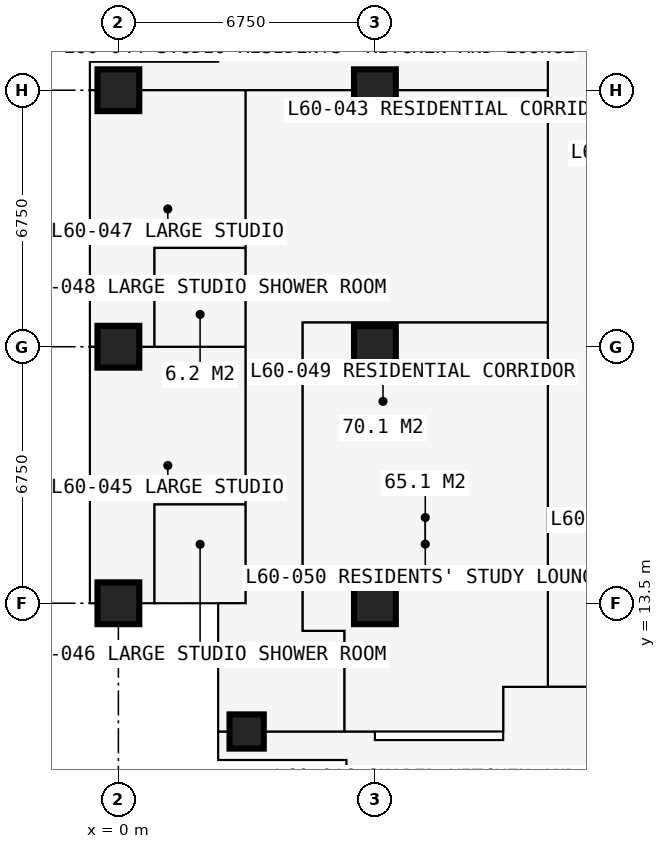
"""IFC4 building model, lengths in metres.
Left out: names, types, materials, properties, quantities, classifications, styles, units other than length and angle.
Written with IfcOpenShell. Run it as: python <this file> out.ifc"""

import sys

from ifc_helpers import new_model, si_unit, direction, frame, frame_2d, origin, origin_2d, place, context, subcontext, project, spatial, rectangle, extrude, element, fill, save


model = new_model("IFC4")
c1 = context("Model", 3, precision=1e-05, world=origin(), true_north=direction((0.0, 1.0)))
c2 = subcontext(c1, "Body", "Model", "MODEL_VIEW")
j1 = project(units=[si_unit("LENGTHUNIT", "METRE"), si_unit("PLANEANGLEUNIT", "RADIAN")], contexts=[c1])
p1 = place(None, origin())
s1 = spatial("IfcSite", under=j1, at=p1, CompositionType="ELEMENT")
p2 = place(p1, origin())
s2 = spatial("IfcBuilding", under=s1, at=p2, CompositionType="ELEMENT")
p3 = place(p2, frame((0.0, 0.0, 222.3)))
s3 = spatial("IfcBuildingStorey", under=s2, at=p3, CompositionType="ELEMENT", Elevation=222.3)
for number, where, z_axis, x_axis in (
    (1, (0.0, 13.5, 0.0), (0.0, 0.0, 1.0), (1.0, 0.0, 0.0)),
    (2, (0.0, 20.25, 0.0), (0.0, 0.0, 1.0), (1.0, 0.0, 0.0)),
    (3, (0.0, 27.0, 0.0), (0.0, 0.0, 1.0), (1.0, 0.0, 0.0)),
):
    element("IfcColumn", number, at=place(p3, frame(where, z_axis=z_axis, x_axis=x_axis)), inside=s3, PredefinedType="COLUMN", context=c2, shape_type="SweptSolid", body=[
        extrude(rectangle(XDim=1.1, YDim=1.1, at=origin_2d()), origin(), (0.0, 0.0, 1.0), 3.6),
    ])
p4 = place(p3, frame((3.375, 10.125, 0.0), z_axis=(0.0, 0.0, 1.0), x_axis=(1.0, 0.0, 0.0)))
e4 = element("IfcColumn", 4, at=p4, inside=s3, PredefinedType="COLUMN", context=c2, shape_type="SweptSolid", body=[
    extrude(rectangle(XDim=0.9, YDim=0.9, at=origin_2d()), origin(), (0.0, 0.0, 1.0), 3.6),
])
for number, where, z_axis, x_axis in (
    (5, (6.75, 13.5, 0.0), (0.0, 0.0, 1.0), (1.0, 0.0, 0.0)),
    (6, (6.75, 20.25, 0.0), (0.0, 0.0, 1.0), (1.0, 0.0, 0.0)),
    (7, (6.75, 27.0, 0.0), (0.0, 0.0, 1.0), (1.0, 0.0, 0.0)),
):
    element("IfcColumn", number, at=place(p3, frame(where, z_axis=z_axis, x_axis=x_axis)), inside=s3, PredefinedType="COLUMN", context=c2, shape_type="SweptSolid", body=[
        extrude(rectangle(XDim=1.1, YDim=1.1, at=origin_2d()), origin(), (0.0, 0.0, 1.0), 3.6),
    ])
p5 = place(p3, frame((2.625, 31.125, 0.0), z_axis=(0.0, 0.0, 1.0), x_axis=(0.0, -1.0, 0.0)))
e8 = element("IfcWall", 8, at=p5, inside=s3, PredefinedType="SOLIDWALL", context=c2, shape_type="SweptSolid", body=[
    extrude(rectangle(XDim=3.375, YDim=0.3, at=frame_2d((1.688, 0.0))), origin(), (0.0, 0.0, 1.0), 3.375),
])
p6 = place(p5, frame((0.788, 0.0, 0.6)))
e9 = element("IfcOpeningElement", 9, at=p6, cuts=e8, PredefinedType="OPENING", context=c2, shape_type="SweptSolid", body=[
    extrude(rectangle(XDim=1.8, YDim=2.1, at=frame_2d((0.9, 1.05))), frame((0.0, 0.16, 0.0), z_axis=(0.0, -1.0, 0.0), x_axis=(1.0, 0.0, 0.0)), (0.0, 0.0, 1.0), 0.32),
])
p7 = place(p3, frame((2.625, 27.75, 0.0), z_axis=(0.0, 0.0, 1.0), x_axis=(-1.0, 0.0, 0.0)))
e10 = element("IfcWall", 10, at=p7, inside=s3, PredefinedType="SOLIDWALL", context=c2, shape_type="SweptSolid", body=[
    extrude(rectangle(XDim=3.375, YDim=0.3, at=frame_2d((1.688, 0.0))), origin(), (0.0, 0.0, 1.0), 3.375),
])
p8 = place(p7, frame((0.788, 0.0, 0.6)))
e11 = element("IfcOpeningElement", 11, at=p8, cuts=e10, PredefinedType="OPENING", context=c2, shape_type="SweptSolid", body=[
    extrude(rectangle(XDim=1.8, YDim=2.1, at=frame_2d((0.9, 1.05))), frame((0.0, 0.16, 0.0), z_axis=(0.0, -1.0, 0.0), x_axis=(1.0, 0.0, 0.0)), (0.0, 0.0, 1.0), 0.32),
])
p9 = place(p3, frame((-0.75, 12.75, 0.0), z_axis=(0.0, 0.0, 1.0), x_axis=(1.0, 0.0, 0.0)))
e12 = element("IfcWall", 12, at=p9, inside=s3, PredefinedType="SOLIDWALL", context=c2, shape_type="SweptSolid", body=[
    extrude(rectangle(XDim=3.375, YDim=0.3, at=frame_2d((1.688, 0.0))), origin(), (0.0, 0.0, 1.0), 3.375),
])
p10 = place(p9, frame((0.788, 0.0, 0.6)))
e13 = element("IfcOpeningElement", 13, at=p10, cuts=e12, PredefinedType="OPENING", context=c2, shape_type="SweptSolid", body=[
    extrude(rectangle(XDim=1.8, YDim=2.1, at=frame_2d((0.9, 1.05))), frame((0.0, 0.16, 0.0), z_axis=(0.0, -1.0, 0.0), x_axis=(1.0, 0.0, 0.0)), (0.0, 0.0, 1.0), 0.32),
])
p11 = place(p3, frame((2.625, 12.75, 0.0), z_axis=(0.0, 0.0, 1.0), x_axis=(0.0, -1.0, 0.0)))
e14 = element("IfcWall", 14, at=p11, inside=s3, PredefinedType="SOLIDWALL", context=c2, shape_type="SweptSolid", body=[
    extrude(rectangle(XDim=3.375, YDim=0.3, at=frame_2d((1.688, 0.0))), origin(), (0.0, 0.0, 1.0), 3.375),
])
p12 = place(p11, frame((0.788, 0.0, 0.6)))
e15 = element("IfcOpeningElement", 15, at=p12, cuts=e14, PredefinedType="OPENING", context=c2, shape_type="SweptSolid", body=[
    extrude(rectangle(XDim=1.8, YDim=2.1, at=frame_2d((0.9, 1.05))), frame((0.0, 0.16, 0.0), z_axis=(0.0, -1.0, 0.0), x_axis=(1.0, 0.0, 0.0)), (0.0, 0.0, 1.0), 0.32),
])
p13 = place(p3, frame((2.625, 9.375, 0.0), z_axis=(0.0, 0.0, 1.0), x_axis=(1.0, 0.0, 0.0)))
e16 = element("IfcWall", 16, at=p13, inside=s3, PredefinedType="SOLIDWALL", context=c2, shape_type="SweptSolid", body=[
    extrude(rectangle(XDim=3.375, YDim=0.3, at=frame_2d((1.688, 0.0))), origin(), (0.0, 0.0, 1.0), 3.375),
])
p14 = place(p13, frame((0.788, 0.0, 0.6)))
e17 = element("IfcOpeningElement", 17, at=p14, cuts=e16, PredefinedType="OPENING", context=c2, shape_type="SweptSolid", body=[
    extrude(rectangle(XDim=1.8, YDim=2.1, at=frame_2d((0.9, 1.05))), frame((0.0, 0.16, 0.0), z_axis=(0.0, -1.0, 0.0), x_axis=(1.0, 0.0, 0.0)), (0.0, 0.0, 1.0), 0.32),
])
p15 = place(p3, frame((6.0, 9.375, 0.0), z_axis=(0.0, 0.0, 1.0), x_axis=(0.0, -1.0, 0.0)))
e18 = element("IfcWall", 18, at=p15, inside=s3, PredefinedType="SOLIDWALL", context=c2, shape_type="SweptSolid", body=[
    extrude(rectangle(XDim=3.375, YDim=0.3, at=frame_2d((1.688, 0.0))), origin(), (0.0, 0.0, 1.0), 3.375),
])
p16 = place(p15, frame((0.788, 0.0, 0.6)))
e19 = element("IfcOpeningElement", 19, at=p16, cuts=e18, PredefinedType="OPENING", context=c2, shape_type="SweptSolid", body=[
    extrude(rectangle(XDim=1.8, YDim=2.1, at=frame_2d((0.9, 1.05))), frame((0.0, 0.16, 0.0), z_axis=(0.0, -1.0, 0.0), x_axis=(1.0, 0.0, 0.0)), (0.0, 0.0, 1.0), 0.32),
])
p17 = place(p3, frame((-0.734, 13.5, 0.0), z_axis=(0.0, 0.0, 1.0), x_axis=(1.0, 0.0, 0.0)))
e20 = element("IfcWall", 20, at=p17, inside=s3, PredefinedType="PARTITIONING", context=c2, shape_type="SweptSolid", body=[
    extrude(rectangle(XDim=4.084, YDim=0.1, at=frame_2d((2.042, 0.0))), origin(), (0.0, 0.0, 1.0), 2.877),
])
p18 = place(p3, frame((-0.734, 20.25, 0.0), z_axis=(0.0, 0.0, 1.0), x_axis=(1.0, 0.0, 0.0)))
e21 = element("IfcWall", 21, at=p18, inside=s3, PredefinedType="PARTITIONING", context=c2, shape_type="SweptSolid", body=[
    extrude(rectangle(XDim=4.084, YDim=0.1, at=frame_2d((2.042, 0.0))), origin(), (0.0, 0.0, 1.0), 2.877),
])
p19 = place(p18, frame((2.434, 0.0, 0.0)))
e22 = element("IfcOpeningElement", 22, at=p19, cuts=e21, PredefinedType="OPENING", context=c2, shape_type="SweptSolid", body=[
    extrude(rectangle(XDim=0.9, YDim=2.2, at=frame_2d((0.45, 1.1))), frame((0.0, 0.06, 0.0), z_axis=(0.0, -1.0, 0.0), x_axis=(1.0, 0.0, 0.0)), (0.0, 0.0, 1.0), 0.12),
])
p20 = place(p3, frame((-0.734, 27.0, 0.0), z_axis=(0.0, 0.0, 1.0), x_axis=(1.0, 0.0, 0.0)))
e23 = element("IfcWall", 23, at=p20, inside=s3, PredefinedType="PARTITIONING", context=c2, shape_type="SweptSolid", body=[
    extrude(rectangle(XDim=12.034, YDim=0.15, at=frame_2d((6.017, 0.0))), origin(), (0.0, 0.0, 1.0), 2.877),
])
p21 = place(p3, frame((0.95, 13.5, 0.0), z_axis=(0.0, 0.0, 1.0), x_axis=(0.0, 1.0, 0.0)))
e24 = element("IfcWall", 24, at=p21, inside=s3, PredefinedType="PARTITIONING", context=c2, shape_type="SweptSolid", body=[
    extrude(rectangle(XDim=2.6, YDim=0.1, at=frame_2d((1.3, 0.0))), origin(), (0.0, 0.0, 1.0), 3.375),
])
p22 = place(p21, frame((0.85, 0.0, 0.0)))
e25 = element("IfcOpeningElement", 25, at=p22, cuts=e24, PredefinedType="OPENING", context=c2, shape_type="SweptSolid", body=[
    extrude(rectangle(XDim=0.9, YDim=2.2, at=frame_2d((0.45, 1.1))), frame((0.0, 0.06, 0.0), z_axis=(0.0, -1.0, 0.0), x_axis=(1.0, 0.0, 0.0)), (0.0, 0.0, 1.0), 0.12),
])
p23 = place(p3, frame((0.95, 16.1, 0.0), z_axis=(0.0, 0.0, 1.0), x_axis=(1.0, 0.0, 0.0)))
e26 = element("IfcWall", 26, at=p23, inside=s3, PredefinedType="PARTITIONING", context=c2, shape_type="SweptSolid", body=[
    extrude(rectangle(XDim=2.4, YDim=0.1, at=frame_2d((1.2, 0.0))), origin(), (0.0, 0.0, 1.0), 3.375),
])
p24 = place(p3, frame((0.95, 20.25, 0.0), z_axis=(0.0, 0.0, 1.0), x_axis=(0.0, 1.0, 0.0)))
e27 = element("IfcWall", 27, at=p24, inside=s3, PredefinedType="PARTITIONING", context=c2, shape_type="SweptSolid", body=[
    extrude(rectangle(XDim=2.6, YDim=0.1, at=frame_2d((1.3, 0.0))), origin(), (0.0, 0.0, 1.0), 3.375),
])
p25 = place(p3, frame((0.95, 22.85, 0.0), z_axis=(0.0, 0.0, 1.0), x_axis=(1.0, 0.0, 0.0)))
e28 = element("IfcWall", 28, at=p25, inside=s3, PredefinedType="PARTITIONING", context=c2, shape_type="SweptSolid", body=[
    extrude(rectangle(XDim=2.4, YDim=0.1, at=frame_2d((1.2, 0.0))), origin(), (0.0, 0.0, 1.0), 3.375),
])
p26 = place(p3, frame((2.625, 12.766, 0.0), z_axis=(0.0, 0.0, 1.0), x_axis=(0.0, 1.0, 0.0)))
e29 = element("IfcWall", 29, at=p26, inside=s3, PredefinedType="PARTITIONING", context=c2, shape_type="SweptSolid", body=[
    extrude(rectangle(XDim=0.734, YDim=0.15, at=frame_2d((0.367, 0.0))), origin(), (0.0, 0.0, 1.0), 3.375),
])
p27 = place(p3, frame((2.775, 10.125, 0.0), z_axis=(0.0, 0.0, 1.0), x_axis=(1.0, 0.0, 0.0)))
e30 = element("IfcWall", 30, at=p27, inside=s3, PredefinedType="PARTITIONING", context=c2, shape_type="SweptSolid", body=[
    extrude(rectangle(XDim=7.35, YDim=0.15, at=frame_2d((3.675, 0.0))), origin(), (0.0, 0.0, 1.0), 2.877),
])
p28 = place(p3, frame((3.35, 13.5, 0.0), z_axis=(0.0, 0.0, 1.0), x_axis=(0.0, 1.0, 0.0)))
e31 = element("IfcWall", 31, at=p28, inside=s3, PredefinedType="PARTITIONING", context=c2, shape_type="SweptSolid", body=[
    extrude(rectangle(XDim=13.5, YDim=0.15, at=frame_2d((6.75, 0.0))), origin(), (0.0, 0.0, 1.0), 3.375),
])
p29 = place(p28, frame((4.2, 0.0, 0.0)))
e32 = element("IfcOpeningElement", 32, at=p29, cuts=e31, PredefinedType="OPENING", context=c2, shape_type="SweptSolid", body=[
    extrude(rectangle(XDim=0.95, YDim=2.2, at=frame_2d((0.475, 1.1))), frame((0.0, 0.085, 0.0), z_axis=(0.0, -1.0, 0.0), x_axis=(1.0, 0.0, 0.0)), (0.0, 0.0, 1.0), 0.17),
])
p30 = place(p28, frame((10.95, 0.0, 0.0)))
e33 = element("IfcOpeningElement", 33, at=p30, cuts=e31, PredefinedType="OPENING", context=c2, shape_type="SweptSolid", body=[
    extrude(rectangle(XDim=0.95, YDim=2.2, at=frame_2d((0.475, 1.1))), frame((0.0, 0.085, 0.0), z_axis=(0.0, -1.0, 0.0), x_axis=(1.0, 0.0, 0.0)), (0.0, 0.0, 1.0), 0.17),
])
p31 = place(p3, frame((4.85, 12.775, 0.0), z_axis=(0.0, 0.0, 1.0), x_axis=(0.0, 1.0, 0.0)))
e34 = element("IfcWall", 34, at=p31, inside=s3, PredefinedType="PARTITIONING", context=c2, shape_type="SweptSolid", body=[
    extrude(rectangle(XDim=8.113, YDim=0.15, at=frame_2d((4.056, 0.0))), origin(), (0.0, 0.0, 1.0), 3.375),
])
p32 = place(p31, frame((3.6, 0.0, 0.0)))
e35 = element("IfcOpeningElement", 35, at=p32, cuts=e34, PredefinedType="OPENING", context=c2, shape_type="SweptSolid", body=[
    extrude(rectangle(XDim=0.95, YDim=2.2, at=frame_2d((0.475, 1.1))), frame((0.0, 0.085, 0.0), z_axis=(0.0, -1.0, 0.0), x_axis=(1.0, 0.0, 0.0)), (0.0, 0.0, 1.0), 0.17),
])
p33 = place(p3, frame((4.85, 12.775, 0.0), z_axis=(0.0, 0.0, 1.0), x_axis=(1.0, 0.0, 0.0)))
e36 = element("IfcWall", 36, at=p33, inside=s3, PredefinedType="PARTITIONING", context=c2, shape_type="SweptSolid", body=[
    extrude(rectangle(XDim=1.1, YDim=0.15, at=frame_2d((0.55, 0.0))), origin(), (0.0, 0.0, 1.0), 3.375),
])
p34 = place(p3, frame((4.85, 20.887, 0.0), z_axis=(0.0, 0.0, 1.0), x_axis=(1.0, 0.0, 0.0)))
e37 = element("IfcWall", 37, at=p34, inside=s3, PredefinedType="PARTITIONING", context=c2, shape_type="SweptSolid", body=[
    extrude(rectangle(XDim=6.45, YDim=0.15, at=frame_2d((3.225, 0.0))), origin(), (0.0, 0.0, 1.0), 3.375),
])
p35 = place(p3, frame((5.95, 10.125, 0.0), z_axis=(0.0, 0.0, 1.0), x_axis=(0.0, 1.0, 0.0)))
e38 = element("IfcWall", 38, at=p35, inside=s3, PredefinedType="PARTITIONING", context=c2, shape_type="SweptSolid", body=[
    extrude(rectangle(XDim=2.65, YDim=0.15, at=frame_2d((1.325, 0.0))), origin(), (0.0, 0.0, 1.0), 3.375),
])
p36 = place(p3, frame((6.75, 9.9, 0.0), z_axis=(0.0, 0.0, 1.0), x_axis=(1.0, 0.0, 0.0)))
e39 = element("IfcWall", 39, at=p36, inside=s3, PredefinedType="PARTITIONING", context=c2, shape_type="SweptSolid", body=[
    extrude(rectangle(XDim=3.375, YDim=0.15, at=frame_2d((1.688, 0.0))), origin(), (0.0, 0.0, 1.0), 3.375),
])
p37 = place(p3, frame((10.125, 9.9, 0.0), z_axis=(0.0, 0.0, 1.0), x_axis=(0.0, 1.0, 0.0)))
e40 = element("IfcWall", 40, at=p37, inside=s3, PredefinedType="PARTITIONING", context=c2, shape_type="SweptSolid", body=[
    extrude(rectangle(XDim=1.4, YDim=0.15, at=frame_2d((0.7, 0.0))), origin(), (0.0, 0.0, 1.0), 3.375),
])
p38 = place(p3, frame((10.125, 11.3, 0.0), z_axis=(0.0, 0.0, 1.0), x_axis=(1.0, 0.0, 0.0)))
e41 = element("IfcWall", 41, at=p38, inside=s3, PredefinedType="PARTITIONING", context=c2, shape_type="SweptSolid", body=[
    extrude(rectangle(XDim=3.375, YDim=0.15, at=frame_2d((1.688, 0.0))), origin(), (0.0, 0.0, 1.0), 3.375),
])
p39 = place(p3, frame((11.3, 11.3, 0.0), z_axis=(0.0, 0.0, 1.0), x_axis=(0.0, 1.0, 0.0)))
e42 = element("IfcWall", 42, at=p39, inside=s3, PredefinedType="PARTITIONING", context=c2, shape_type="SweptSolid", body=[
    extrude(rectangle(XDim=19.3, YDim=0.15, at=frame_2d((9.65, 0.0))), origin(), (0.0, 0.0, 1.0), 3.375),
])
p40 = place(p39, frame((18.1, 0.0, 0.0)))
e43 = element("IfcOpeningElement", 43, at=p40, cuts=e42, PredefinedType="OPENING", context=c2, shape_type="SweptSolid", body=[
    extrude(rectangle(XDim=1.0, YDim=2.2, at=frame_2d((0.5, 1.1))), frame((0.0, 0.085, 0.0), z_axis=(0.0, -1.0, 0.0), x_axis=(1.0, 0.0, 0.0)), (0.0, 0.0, 1.0), 0.17),
])
p41 = place(p39, frame((12.137, 0.0, 0.0)))
e44 = element("IfcOpeningElement", 44, at=p41, cuts=e42, PredefinedType="OPENING", context=c2, shape_type="SweptSolid", body=[
    extrude(rectangle(XDim=1.0, YDim=2.2, at=frame_2d((0.5, 1.1))), frame((0.0, 0.085, 0.0), z_axis=(0.0, -1.0, 0.0), x_axis=(1.0, 0.0, 0.0)), (0.0, 0.0, 1.0), 0.17),
])
p42 = place(p8, origin())
e45 = element("IfcWindow", 45, at=p42, inside=s3, PartitioningType="SINGLE_PANEL", PredefinedType="WINDOW", context=c2, shape_type="SweptSolid", body=[
    extrude(rectangle(XDim=1.8, YDim=2.1, at=frame_2d((0.9, 1.05))), frame((0.0, 0.03, 0.0), z_axis=(0.0, -1.0, 0.0), x_axis=(1.0, 0.0, 0.0)), (0.0, 0.0, 1.0), 0.06),
])
fill(e11, e45)
p43 = place(p10, origin())
e46 = element("IfcWindow", 46, at=p43, inside=s3, PartitioningType="SINGLE_PANEL", PredefinedType="WINDOW", context=c2, shape_type="SweptSolid", body=[
    extrude(rectangle(XDim=1.8, YDim=2.1, at=frame_2d((0.9, 1.05))), frame((0.0, 0.03, 0.0), z_axis=(0.0, -1.0, 0.0), x_axis=(1.0, 0.0, 0.0)), (0.0, 0.0, 1.0), 0.06),
])
fill(e13, e46)
p44 = place(p12, origin())
e47 = element("IfcWindow", 47, at=p44, inside=s3, PartitioningType="SINGLE_PANEL", PredefinedType="WINDOW", context=c2, shape_type="SweptSolid", body=[
    extrude(rectangle(XDim=1.8, YDim=2.1, at=frame_2d((0.9, 1.05))), frame((0.0, 0.03, 0.0), z_axis=(0.0, -1.0, 0.0), x_axis=(1.0, 0.0, 0.0)), (0.0, 0.0, 1.0), 0.06),
])
fill(e15, e47)
p45 = place(p14, origin())
e48 = element("IfcWindow", 48, at=p45, inside=s3, PartitioningType="SINGLE_PANEL", PredefinedType="WINDOW", context=c2, shape_type="SweptSolid", body=[
    extrude(rectangle(XDim=1.8, YDim=2.1, at=frame_2d((0.9, 1.05))), frame((0.0, 0.03, 0.0), z_axis=(0.0, -1.0, 0.0), x_axis=(1.0, 0.0, 0.0)), (0.0, 0.0, 1.0), 0.06),
])
fill(e17, e48)
p46 = place(p29, origin())
e49 = element("IfcDoor", 49, at=p46, inside=s3, OperationType="SINGLE_SWING_LEFT", PredefinedType="DOOR", context=c2, shape_type="SweptSolid", body=[
    extrude(rectangle(XDim=0.95, YDim=2.2, at=frame_2d((0.475, 1.1))), frame((0.0, 0.025, 0.0), z_axis=(0.0, -1.0, 0.0), x_axis=(1.0, 0.0, 0.0)), (0.0, 0.0, 1.0), 0.05),
])
fill(e32, e49)
p47 = place(p22, origin())
e50 = element("IfcDoor", 50, at=p47, inside=s3, OperationType="SINGLE_SWING_RIGHT", PredefinedType="DOOR", context=c2, shape_type="SweptSolid", body=[
    extrude(rectangle(XDim=0.9, YDim=2.2, at=frame_2d((0.45, 1.1))), frame((0.0, 0.025, 0.0), z_axis=(0.0, -1.0, 0.0), x_axis=(1.0, 0.0, 0.0)), (0.0, 0.0, 1.0), 0.05),
])
fill(e25, e50)
p48 = place(p30, origin())
e51 = element("IfcDoor", 51, at=p48, inside=s3, OperationType="SINGLE_SWING_LEFT", PredefinedType="DOOR", context=c2, shape_type="SweptSolid", body=[
    extrude(rectangle(XDim=0.95, YDim=2.2, at=frame_2d((0.475, 1.1))), frame((0.0, 0.025, 0.0), z_axis=(0.0, -1.0, 0.0), x_axis=(1.0, 0.0, 0.0)), (0.0, 0.0, 1.0), 0.05),
])
fill(e33, e51)
p49 = place(p19, origin())
e52 = element("IfcDoor", 52, at=p49, inside=s3, OperationType="SINGLE_SWING_RIGHT", PredefinedType="DOOR", context=c2, shape_type="SweptSolid", body=[
    extrude(rectangle(XDim=0.9, YDim=2.2, at=frame_2d((0.45, 1.1))), frame((0.0, 0.025, 0.0), z_axis=(0.0, -1.0, 0.0), x_axis=(1.0, 0.0, 0.0)), (0.0, 0.0, 1.0), 0.05),
])
fill(e22, e52)
p50 = place(p41, origin())
e53 = element("IfcDoor", 53, at=p50, inside=s3, OperationType="SINGLE_SWING_LEFT", PredefinedType="DOOR", context=c2, shape_type="SweptSolid", body=[
    extrude(rectangle(XDim=1.0, YDim=2.2, at=frame_2d((0.5, 1.1))), frame((0.0, 0.025, 0.0), z_axis=(0.0, -1.0, 0.0), x_axis=(1.0, 0.0, 0.0)), (0.0, 0.0, 1.0), 0.05),
])
fill(e44, e53)
p51 = place(p32, origin())
e54 = element("IfcDoor", 54, at=p51, inside=s3, OperationType="SINGLE_SWING_LEFT", PredefinedType="DOOR", context=c2, shape_type="SweptSolid", body=[
    extrude(rectangle(XDim=0.95, YDim=2.2, at=frame_2d((0.475, 1.1))), frame((0.0, 0.025, 0.0), z_axis=(0.0, -1.0, 0.0), x_axis=(1.0, 0.0, 0.0)), (0.0, 0.0, 1.0), 0.05),
])
fill(e35, e54)
save(model, sys.argv[1])
